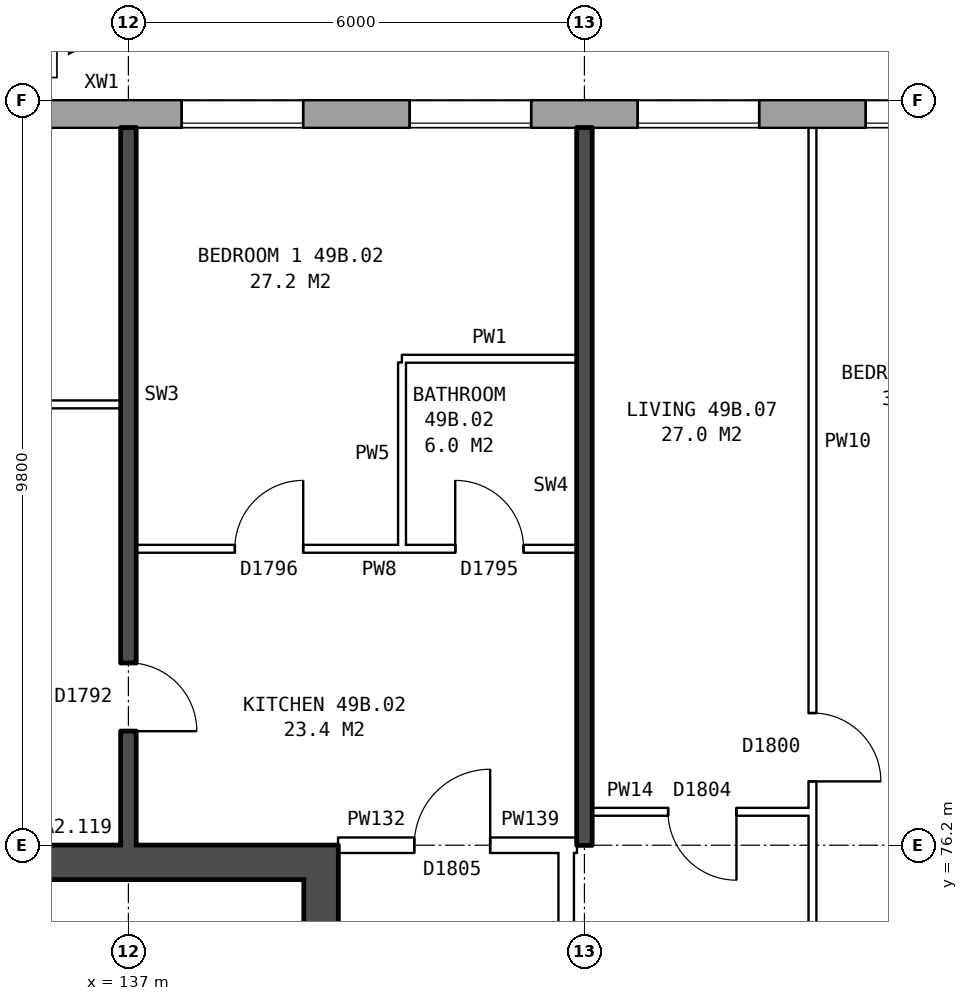
"""IFC4 building model, lengths in metres.
Left out: names, types, materials, properties, quantities, classifications, styles, units other than length and angle.
Written with IfcOpenShell. Run it as: python <this file> out.ifc"""

import sys

from ifc_helpers import new_model, si_unit, direction, frame, frame_2d, origin, place, context, subcontext, project, spatial, rectangle, extrude, element, fill, save


model = new_model("IFC4")
c1 = context("Model", 3, precision=1e-05, world=origin(), true_north=direction((0.0, 1.0)))
c2 = subcontext(c1, "Body", "Model", "MODEL_VIEW")
j1 = project(units=[si_unit("LENGTHUNIT", "METRE"), si_unit("PLANEANGLEUNIT", "RADIAN")], contexts=[c1])
p1 = place(None, origin())
s1 = spatial("IfcSite", under=j1, at=p1, CompositionType="ELEMENT")
p2 = place(p1, origin())
s2 = spatial("IfcBuilding", under=s1, at=p2, CompositionType="ELEMENT")
p3 = place(p2, frame((0.0, 0.0, 175.8)))
s3 = spatial("IfcBuildingStorey", under=s2, at=p3, CompositionType="ELEMENT", Elevation=175.8)
p4 = place(p3, frame((167.175, 85.82, 0.0), z_axis=(0.0, 0.0, 1.0), x_axis=(-1.0, 0.0, 0.0)))
e1 = element("IfcWall", 1, at=p4, inside=s3, PredefinedType="STANDARD", context=c2, shape_type="SweptSolid", body=[
    extrude(rectangle(XDim=33.101, YDim=0.36, at=frame_2d((16.55, 0.0))), origin(), (0.0, 0.0, 1.0), 2.85),
])
p5 = place(p4, frame((0.3, 0.0, 0.8)))
e2 = element("IfcOpeningElement", 2, at=p5, cuts=e1, PredefinedType="OPENING", context=c2, shape_type="SweptSolid", body=[
    extrude(rectangle(XDim=0.6, YDim=1.8, at=frame_2d((0.3, 0.9))), frame((0.0, 0.19, 0.0), z_axis=(0.0, -1.0, 0.0), x_axis=(1.0, 0.0, 0.0)), (0.0, 0.0, 1.0), 0.38),
])
p6 = place(p4, frame((3.875, 0.0, 0.8)))
e3 = element("IfcOpeningElement", 3, at=p6, cuts=e1, PredefinedType="OPENING", context=c2, shape_type="SweptSolid", body=[
    extrude(rectangle(XDim=1.6, YDim=1.8, at=frame_2d((0.8, 0.9))), frame((0.0, 0.19, 0.0), z_axis=(0.0, -1.0, 0.0), x_axis=(1.0, 0.0, 0.0)), (0.0, 0.0, 1.0), 0.38),
])
p7 = place(p4, frame((6.875, 0.0, 0.8)))
e4 = element("IfcOpeningElement", 4, at=p7, cuts=e1, PredefinedType="OPENING", context=c2, shape_type="SweptSolid", body=[
    extrude(rectangle(XDim=1.6, YDim=1.8, at=frame_2d((0.8, 0.9))), frame((0.0, 0.19, 0.0), z_axis=(0.0, -1.0, 0.0), x_axis=(1.0, 0.0, 0.0)), (0.0, 0.0, 1.0), 0.38),
])
p8 = place(p4, frame((9.875, 0.0, 0.8)))
e5 = element("IfcOpeningElement", 5, at=p8, cuts=e1, PredefinedType="OPENING", context=c2, shape_type="SweptSolid", body=[
    extrude(rectangle(XDim=1.6, YDim=1.8, at=frame_2d((0.8, 0.9))), frame((0.0, 0.19, 0.0), z_axis=(0.0, -1.0, 0.0), x_axis=(1.0, 0.0, 0.0)), (0.0, 0.0, 1.0), 0.38),
])
p9 = place(p4, frame((12.875, 0.0, 0.8)))
e6 = element("IfcOpeningElement", 6, at=p9, cuts=e1, PredefinedType="OPENING", context=c2, shape_type="SweptSolid", body=[
    extrude(rectangle(XDim=1.6, YDim=1.8, at=frame_2d((0.8, 0.9))), frame((0.0, 0.19, 0.0), z_axis=(0.0, -1.0, 0.0), x_axis=(1.0, 0.0, 0.0)), (0.0, 0.0, 1.0), 0.38),
])
p10 = place(p4, frame((15.875, 0.0, 0.8)))
e7 = element("IfcOpeningElement", 7, at=p10, cuts=e1, PredefinedType="OPENING", context=c2, shape_type="SweptSolid", body=[
    extrude(rectangle(XDim=1.6, YDim=1.8, at=frame_2d((0.8, 0.9))), frame((0.0, 0.19, 0.0), z_axis=(0.0, -1.0, 0.0), x_axis=(1.0, 0.0, 0.0)), (0.0, 0.0, 1.0), 0.38),
])
p11 = place(p4, frame((18.875, 0.0, 0.8)))
e8 = element("IfcOpeningElement", 8, at=p11, cuts=e1, PredefinedType="OPENING", context=c2, shape_type="SweptSolid", body=[
    extrude(rectangle(XDim=1.6, YDim=1.8, at=frame_2d((0.8, 0.9))), frame((0.0, 0.19, 0.0), z_axis=(0.0, -1.0, 0.0), x_axis=(1.0, 0.0, 0.0)), (0.0, 0.0, 1.0), 0.38),
])
p12 = place(p4, frame((21.875, 0.0, 0.8)))
e9 = element("IfcOpeningElement", 9, at=p12, cuts=e1, PredefinedType="OPENING", context=c2, shape_type="SweptSolid", body=[
    extrude(rectangle(XDim=1.6, YDim=1.8, at=frame_2d((0.8, 0.9))), frame((0.0, 0.19, 0.0), z_axis=(0.0, -1.0, 0.0), x_axis=(1.0, 0.0, 0.0)), (0.0, 0.0, 1.0), 0.38),
])
p13 = place(p4, frame((24.875, 0.0, 0.8)))
e10 = element("IfcOpeningElement", 10, at=p13, cuts=e1, PredefinedType="OPENING", context=c2, shape_type="SweptSolid", body=[
    extrude(rectangle(XDim=1.6, YDim=1.8, at=frame_2d((0.8, 0.9))), frame((0.0, 0.19, 0.0), z_axis=(0.0, -1.0, 0.0), x_axis=(1.0, 0.0, 0.0)), (0.0, 0.0, 1.0), 0.38),
])
p14 = place(p4, frame((27.875, 0.0, 0.8)))
e11 = element("IfcOpeningElement", 11, at=p14, cuts=e1, PredefinedType="OPENING", context=c2, shape_type="SweptSolid", body=[
    extrude(rectangle(XDim=1.6, YDim=1.8, at=frame_2d((0.8, 0.9))), frame((0.0, 0.19, 0.0), z_axis=(0.0, -1.0, 0.0), x_axis=(1.0, 0.0, 0.0)), (0.0, 0.0, 1.0), 0.38),
])
p15 = place(p4, frame((31.575, 0.0, 1.4)))
e12 = element("IfcOpeningElement", 12, at=p15, cuts=e1, PredefinedType="OPENING", context=c2, shape_type="SweptSolid", body=[
    extrude(rectangle(XDim=1.2, YDim=1.2, at=frame_2d((0.6, 0.6))), frame((0.0, 0.19, 0.0), z_axis=(0.0, -1.0, 0.0), x_axis=(1.0, 0.0, 0.0)), (0.0, 0.0, 1.0), 0.38),
])
p16 = place(p4, frame((1.2, 0.0, 1.7)))
e13 = element("IfcOpeningElement", 13, at=p16, cuts=e1, PredefinedType="OPENING", context=c2, shape_type="SweptSolid", body=[
    extrude(rectangle(XDim=0.6, YDim=0.9, at=frame_2d((0.3, 0.45))), frame((0.0, 0.19, 0.0), z_axis=(0.0, -1.0, 0.0), x_axis=(1.0, 0.0, 0.0)), (0.0, 0.0, 1.0), 0.38),
])
p17 = place(p4, frame((2.8, 0.0, 0.8)))
e14 = element("IfcOpeningElement", 14, at=p17, cuts=e1, PredefinedType="OPENING", context=c2, shape_type="SweptSolid", body=[
    extrude(rectangle(XDim=0.6, YDim=0.9, at=frame_2d((0.3, 0.45))), frame((0.0, 0.19, 0.0), z_axis=(0.0, -1.0, 0.0), x_axis=(1.0, 0.0, 0.0)), (0.0, 0.0, 1.0), 0.38),
])
p18 = place(p3, frame((139.535, 63.8, 0.0), z_axis=(0.0, 0.0, 1.0), x_axis=(0.0, 1.0, 0.0)))
e15 = element("IfcWall", 15, at=p18, inside=s3, PredefinedType="SHEAR", context=c2, shape_type="SweptSolid", body=[
    extrude(rectangle(XDim=12.4, YDim=0.45, at=frame_2d((6.2, 0.0))), origin(), (0.0, 0.0, 1.0), 2.85),
])
p19 = place(p18, frame((1.325, 0.0, 0.0)))
e16 = element("IfcOpeningElement", 16, at=p19, cuts=e15, PredefinedType="OPENING", context=c2, shape_type="SweptSolid", body=[
    extrude(rectangle(XDim=1.1, YDim=2.1, at=frame_2d((0.55, 1.05))), frame((0.0, 0.235, 0.0), z_axis=(0.0, -1.0, 0.0), x_axis=(1.0, 0.0, 0.0)), (0.0, 0.0, 1.0), 0.47),
])
p20 = place(p18, frame((3.6, 0.0, 0.0)))
e17 = element("IfcOpeningElement", 17, at=p20, cuts=e15, PredefinedType="OPENING", context=c2, shape_type="SweptSolid", body=[
    extrude(rectangle(XDim=1.1, YDim=2.1, at=frame_2d((0.55, 1.05))), frame((0.0, 0.235, 0.0), z_axis=(0.0, -1.0, 0.0), x_axis=(1.0, 0.0, 0.0)), (0.0, 0.0, 1.0), 0.47),
])
p21 = place(p18, frame((5.8, 0.0, 0.0)))
e18 = element("IfcOpeningElement", 18, at=p21, cuts=e15, PredefinedType="OPENING", context=c2, shape_type="SweptSolid", body=[
    extrude(rectangle(XDim=1.1, YDim=2.1, at=frame_2d((0.55, 1.05))), frame((0.0, 0.235, 0.0), z_axis=(0.0, -1.0, 0.0), x_axis=(1.0, 0.0, 0.0)), (0.0, 0.0, 1.0), 0.47),
])
p22 = place(p18, frame((9.9, 0.0, 0.0)))
e19 = element("IfcOpeningElement", 19, at=p22, cuts=e15, PredefinedType="OPENING", context=c2, shape_type="SweptSolid", body=[
    extrude(rectangle(XDim=1.1, YDim=2.1, at=frame_2d((0.55, 1.05))), frame((0.0, 0.235, 0.0), z_axis=(0.0, -1.0, 0.0), x_axis=(1.0, 0.0, 0.0)), (0.0, 0.0, 1.0), 0.47),
])
p23 = place(p18, frame((8.125, 0.0, 0.0)))
e20 = element("IfcOpeningElement", 20, at=p23, cuts=e15, PredefinedType="OPENING", context=c2, shape_type="SweptSolid", body=[
    extrude(rectangle(XDim=0.85, YDim=2.1, at=frame_2d((0.425, 1.05))), frame((0.0, 0.235, 0.0), z_axis=(0.0, -1.0, 0.0), x_axis=(1.0, 0.0, 0.0)), (0.0, 0.0, 1.0), 0.47),
])
p24 = place(p3, frame((139.31, 75.975, 0.0), z_axis=(0.0, 0.0, 1.0), x_axis=(-1.0, 0.0, 0.0)))
e21 = element("IfcWall", 21, at=p24, inside=s3, PredefinedType="SHEAR", context=c2, shape_type="SweptSolid", body=[
    extrude(rectangle(XDim=7.5, YDim=0.45, at=frame_2d((3.75, 0.0))), origin(), (0.0, 0.0, 1.0), 2.85),
])
p25 = place(p3, frame((142.76, 63.9, 0.0), z_axis=(0.0, 0.0, 1.0), x_axis=(0.0, 1.0, 0.0)))
e22 = element("IfcWall", 22, at=p25, inside=s3, PredefinedType="PARTITIONING", context=c2, shape_type="SweptSolid", body=[
    extrude(rectangle(XDim=12.2, YDim=0.2, at=frame_2d((6.1, 0.0))), origin(), (0.0, 0.0, 1.0), 2.85),
])
p26 = place(p25, frame((5.1, 0.0, 0.0)))
e23 = element("IfcOpeningElement", 23, at=p26, cuts=e22, PredefinedType="OPENING", context=c2, shape_type="SweptSolid", body=[
    extrude(rectangle(XDim=2.0, YDim=2.1, at=frame_2d((1.0, 1.05))), frame((0.0, 0.11, 0.0), z_axis=(0.0, -1.0, 0.0), x_axis=(1.0, 0.0, 0.0)), (0.0, 0.0, 1.0), 0.22),
])
p27 = place(p3, frame((139.76, 76.2, 0.0), z_axis=(0.0, 0.0, 1.0), x_axis=(1.0, 0.0, 0.0)))
e24 = element("IfcWall", 24, at=p27, inside=s3, PredefinedType="PARTITIONING", context=c2, shape_type="SweptSolid", body=[
    extrude(rectangle(XDim=3.0, YDim=0.2, at=frame_2d((1.5, 0.0))), origin(), (0.0, 0.0, 1.0), 2.85),
])
p28 = place(p27, frame((1.0, 0.0, 0.0)))
e25 = element("IfcOpeningElement", 25, at=p28, cuts=e24, PredefinedType="OPENING", context=c2, shape_type="SweptSolid", body=[
    extrude(rectangle(XDim=1.0, YDim=2.1, at=frame_2d((0.5, 1.05))), frame((0.0, 0.11, 0.0), z_axis=(0.0, -1.0, 0.0), x_axis=(1.0, 0.0, 0.0)), (0.0, 0.0, 1.0), 0.22),
])
p29 = place(p3, frame((142.76, 76.2, 0.0), z_axis=(0.0, 0.0, 1.0), x_axis=(1.0, 0.0, 0.0)))
e26 = element("IfcWall", 26, at=p29, inside=s3, PredefinedType="PARTITIONING", context=c2, shape_type="SweptSolid", body=[
    extrude(rectangle(XDim=0.14, YDim=0.2, at=frame_2d((0.07, 0.0))), origin(), (0.0, 0.0, 1.0), 2.85),
])
p30 = place(p3, frame((143.1, 76.64, 0.0), z_axis=(0.0, 0.0, 1.0), x_axis=(1.0, 0.0, 0.0)))
e27 = element("IfcWall", 27, at=p30, inside=s3, PredefinedType="PARTITIONING", context=c2, shape_type="SweptSolid", body=[
    extrude(rectangle(XDim=2.9, YDim=0.1, at=frame_2d((1.45, 0.0))), origin(), (0.0, 0.0, 1.0), 2.85),
])
p31 = place(p30, frame((1.0, 0.0, 0.0)))
e28 = element("IfcOpeningElement", 28, at=p31, cuts=e27, PredefinedType="OPENING", context=c2, shape_type="SweptSolid", body=[
    extrude(rectangle(XDim=0.9, YDim=2.1, at=frame_2d((0.45, 1.05))), frame((0.0, 0.06, 0.0), z_axis=(0.0, -1.0, 0.0), x_axis=(1.0, 0.0, 0.0)), (0.0, 0.0, 1.0), 0.12),
])
p32 = place(p3, frame((137.1, 80.1, 0.0), z_axis=(0.0, 0.0, 1.0), x_axis=(1.0, 0.0, 0.0)))
e29 = element("IfcWall", 29, at=p32, inside=s3, PredefinedType="PARTITIONING", context=c2, shape_type="SweptSolid", body=[
    extrude(rectangle(XDim=5.8, YDim=0.1, at=frame_2d((2.9, 0.0))), origin(), (0.0, 0.0, 1.0), 2.85),
])
p33 = place(p32, frame((1.3, 0.0, 0.0)))
e30 = element("IfcOpeningElement", 30, at=p33, cuts=e29, PredefinedType="OPENING", context=c2, shape_type="SweptSolid", body=[
    extrude(rectangle(XDim=0.9, YDim=2.1, at=frame_2d((0.45, 1.05))), frame((0.0, 0.06, 0.0), z_axis=(0.0, -1.0, 0.0), x_axis=(1.0, 0.0, 0.0)), (0.0, 0.0, 1.0), 0.12),
])
p34 = place(p32, frame((4.2, 0.0, 0.0)))
e31 = element("IfcOpeningElement", 31, at=p34, cuts=e29, PredefinedType="OPENING", context=c2, shape_type="SweptSolid", body=[
    extrude(rectangle(XDim=0.9, YDim=2.1, at=frame_2d((0.45, 1.05))), frame((0.0, 0.06, 0.0), z_axis=(0.0, -1.0, 0.0), x_axis=(1.0, 0.0, 0.0)), (0.0, 0.0, 1.0), 0.12),
])
p35 = place(p3, frame((131.36, 82.0, 0.0), z_axis=(0.0, 0.0, 1.0), x_axis=(1.0, 0.0, 0.0)))
e32 = element("IfcWall", 32, at=p35, inside=s3, PredefinedType="PARTITIONING", context=c2, shape_type="SweptSolid", body=[
    extrude(rectangle(XDim=5.54, YDim=0.1, at=frame_2d((2.77, 0.0))), origin(), (0.0, 0.0, 1.0), 2.85),
])
p36 = place(p35, frame((2.32, 0.0, 0.0)))
e33 = element("IfcOpeningElement", 33, at=p36, cuts=e32, PredefinedType="OPENING", context=c2, shape_type="SweptSolid", body=[
    extrude(rectangle(XDim=0.9, YDim=2.1, at=frame_2d((0.45, 1.05))), frame((0.0, 0.06, 0.0), z_axis=(0.0, -1.0, 0.0), x_axis=(1.0, 0.0, 0.0)), (0.0, 0.0, 1.0), 0.12),
])
p37 = place(p3, frame((140.6, 82.6, 0.0), z_axis=(0.0, 0.0, 1.0), x_axis=(1.0, 0.0, 0.0)))
e34 = element("IfcWall", 34, at=p37, inside=s3, PredefinedType="PARTITIONING", context=c2, shape_type="SweptSolid", body=[
    extrude(rectangle(XDim=2.3, YDim=0.1, at=frame_2d((1.15, 0.0))), origin(), (0.0, 0.0, 1.0), 2.85),
])
p38 = place(p3, frame((137.0, 76.2, 0.0), z_axis=(0.0, 0.0, 1.0), x_axis=(0.0, 1.0, 0.0)))
e35 = element("IfcWall", 35, at=p38, inside=s3, PredefinedType="SOLIDWALL", context=c2, shape_type="SweptSolid", body=[
    extrude(rectangle(XDim=9.44, YDim=0.2, at=frame_2d((4.72, 0.0))), origin(), (0.0, 0.0, 1.0), 2.85),
])
p39 = place(p38, frame((1.5, 0.0, 0.0)))
e36 = element("IfcOpeningElement", 36, at=p39, cuts=e35, PredefinedType="OPENING", context=c2, shape_type="SweptSolid", body=[
    extrude(rectangle(XDim=0.9, YDim=2.1, at=frame_2d((0.45, 1.05))), frame((0.0, 0.11, 0.0), z_axis=(0.0, -1.0, 0.0), x_axis=(1.0, 0.0, 0.0)), (0.0, 0.0, 1.0), 0.22),
])
p40 = place(p3, frame((140.6, 80.15, 0.0), z_axis=(0.0, 0.0, 1.0), x_axis=(0.0, 1.0, 0.0)))
e37 = element("IfcWall", 37, at=p40, inside=s3, PredefinedType="PARTITIONING", context=c2, shape_type="SweptSolid", body=[
    extrude(rectangle(XDim=2.4, YDim=0.1, at=frame_2d((1.2, 0.0))), origin(), (0.0, 0.0, 1.0), 2.85),
])
p41 = place(p3, frame((143.0, 76.2, 0.0), z_axis=(0.0, 0.0, 1.0), x_axis=(0.0, 1.0, 0.0)))
e38 = element("IfcWall", 38, at=p41, inside=s3, PredefinedType="SOLIDWALL", context=c2, shape_type="SweptSolid", body=[
    extrude(rectangle(XDim=9.44, YDim=0.2, at=frame_2d((4.72, 0.0))), origin(), (0.0, 0.0, 1.0), 2.85),
])
p42 = place(p3, frame((146.0, 71.3, 0.0), z_axis=(0.0, 0.0, 1.0), x_axis=(0.0, 1.0, 0.0)))
e39 = element("IfcWall", 39, at=p42, inside=s3, PredefinedType="PARTITIONING", context=c2, shape_type="SweptSolid", body=[
    extrude(rectangle(XDim=14.34, YDim=0.1, at=frame_2d((7.17, 0.0))), origin(), (0.0, 0.0, 1.0), 2.85),
])
p43 = place(p42, frame((5.74, 0.0, 0.0)))
e40 = element("IfcOpeningElement", 40, at=p43, cuts=e39, PredefinedType="OPENING", context=c2, shape_type="SweptSolid", body=[
    extrude(rectangle(XDim=0.9, YDim=2.1, at=frame_2d((0.45, 1.05))), frame((0.0, 0.06, 0.0), z_axis=(0.0, -1.0, 0.0), x_axis=(1.0, 0.0, 0.0)), (0.0, 0.0, 1.0), 0.12),
])
p44 = place(p42, frame((0.4, 0.0, 0.0)))
e41 = element("IfcOpeningElement", 41, at=p44, cuts=e39, PredefinedType="OPENING", context=c2, shape_type="SweptSolid", body=[
    extrude(rectangle(XDim=0.9, YDim=2.1, at=frame_2d((0.45, 1.05))), frame((0.0, 0.06, 0.0), z_axis=(0.0, -1.0, 0.0), x_axis=(1.0, 0.0, 0.0)), (0.0, 0.0, 1.0), 0.12),
])
p45 = place(p11, origin())
e42 = element("IfcWindow", 42, at=p45, inside=s3, PartitioningType="SINGLE_PANEL", PredefinedType="WINDOW", context=c2, shape_type="SweptSolid", body=[
    extrude(rectangle(XDim=1.6, YDim=1.8, at=frame_2d((0.8, 0.9))), frame((0.0, 0.15, 0.0), z_axis=(0.0, -1.0, 0.0), x_axis=(1.0, 0.0, 0.0)), (0.0, 0.0, 1.0), 0.06),
])
fill(e8, e42)
p46 = place(p12, origin())
e43 = element("IfcWindow", 43, at=p46, inside=s3, PartitioningType="SINGLE_PANEL", PredefinedType="WINDOW", context=c2, shape_type="SweptSolid", body=[
    extrude(rectangle(XDim=1.6, YDim=1.8, at=frame_2d((0.8, 0.9))), frame((0.0, 0.15, 0.0), z_axis=(0.0, -1.0, 0.0), x_axis=(1.0, 0.0, 0.0)), (0.0, 0.0, 1.0), 0.06),
])
fill(e9, e43)
p47 = place(p13, origin())
e44 = element("IfcWindow", 44, at=p47, inside=s3, PartitioningType="SINGLE_PANEL", PredefinedType="WINDOW", context=c2, shape_type="SweptSolid", body=[
    extrude(rectangle(XDim=1.6, YDim=1.8, at=frame_2d((0.8, 0.9))), frame((0.0, 0.15, 0.0), z_axis=(0.0, -1.0, 0.0), x_axis=(1.0, 0.0, 0.0)), (0.0, 0.0, 1.0), 0.06),
])
fill(e10, e44)
p48 = place(p14, origin())
e45 = element("IfcWindow", 45, at=p48, inside=s3, PartitioningType="SINGLE_PANEL", PredefinedType="WINDOW", context=c2, shape_type="SweptSolid", body=[
    extrude(rectangle(XDim=1.6, YDim=1.8, at=frame_2d((0.8, 0.9))), frame((0.0, 0.15, 0.0), z_axis=(0.0, -1.0, 0.0), x_axis=(1.0, 0.0, 0.0)), (0.0, 0.0, 1.0), 0.06),
])
fill(e11, e45)
p49 = place(p33, origin())
e46 = element("IfcDoor", 46, at=p49, inside=s3, OperationType="SINGLE_SWING_RIGHT", PredefinedType="DOOR", context=c2, shape_type="SweptSolid", body=[
    extrude(rectangle(XDim=0.9, YDim=2.1, at=frame_2d((0.45, 1.05))), frame((0.0, 0.025, 0.0), z_axis=(0.0, -1.0, 0.0), x_axis=(1.0, 0.0, 0.0)), (0.0, 0.0, 1.0), 0.05),
])
fill(e30, e46)
p50 = place(p28, origin())
e47 = element("IfcDoor", 47, at=p50, inside=s3, OperationType="SINGLE_SWING_RIGHT", PredefinedType="DOOR", context=c2, shape_type="SweptSolid", body=[
    extrude(rectangle(XDim=1.0, YDim=2.1, at=frame_2d((0.5, 1.05))), frame((0.0, 0.025, 0.0), z_axis=(0.0, -1.0, 0.0), x_axis=(1.0, 0.0, 0.0)), (0.0, 0.0, 1.0), 0.05),
])
fill(e25, e47)
p51 = place(p39, frame((0.9, 0.0, 0.0), z_axis=(0.0, 0.0, 1.0), x_axis=(-1.0, 0.0, 0.0)))
e48 = element("IfcDoor", 48, at=p51, inside=s3, OperationType="SINGLE_SWING_RIGHT", PredefinedType="DOOR", context=c2, shape_type="SweptSolid", body=[
    extrude(rectangle(XDim=0.9, YDim=2.1, at=frame_2d((0.45, 1.05))), frame((0.0, 0.025, 0.0), z_axis=(0.0, -1.0, 0.0), x_axis=(1.0, 0.0, 0.0)), (0.0, 0.0, 1.0), 0.05),
])
fill(e36, e48)
p52 = place(p34, origin())
e49 = element("IfcDoor", 49, at=p52, inside=s3, OperationType="SINGLE_SWING_LEFT", PredefinedType="DOOR", context=c2, shape_type="SweptSolid", body=[
    extrude(rectangle(XDim=0.9, YDim=2.1, at=frame_2d((0.45, 1.05))), frame((0.0, 0.025, 0.0), z_axis=(0.0, -1.0, 0.0), x_axis=(1.0, 0.0, 0.0)), (0.0, 0.0, 1.0), 0.05),
])
fill(e31, e49)
p53 = place(p43, frame((0.9, 0.0, 0.0), z_axis=(0.0, 0.0, 1.0), x_axis=(-1.0, 0.0, 0.0)))
e50 = element("IfcDoor", 50, at=p53, inside=s3, OperationType="SINGLE_SWING_RIGHT", PredefinedType="DOOR", context=c2, shape_type="SweptSolid", body=[
    extrude(rectangle(XDim=0.9, YDim=2.1, at=frame_2d((0.45, 1.05))), frame((0.0, 0.025, 0.0), z_axis=(0.0, -1.0, 0.0), x_axis=(1.0, 0.0, 0.0)), (0.0, 0.0, 1.0), 0.05),
])
fill(e40, e50)
p54 = place(p31, frame((0.9, 0.0, 0.0), z_axis=(0.0, 0.0, 1.0), x_axis=(-1.0, 0.0, 0.0)))
e51 = element("IfcDoor", 51, at=p54, inside=s3, OperationType="SINGLE_SWING_LEFT", PredefinedType="DOOR", context=c2, shape_type="SweptSolid", body=[
    extrude(rectangle(XDim=0.9, YDim=2.1, at=frame_2d((0.45, 1.05))), frame((0.0, 0.025, 0.0), z_axis=(0.0, -1.0, 0.0), x_axis=(1.0, 0.0, 0.0)), (0.0, 0.0, 1.0), 0.05),
])
fill(e28, e51)
save(model, sys.argv[1])
